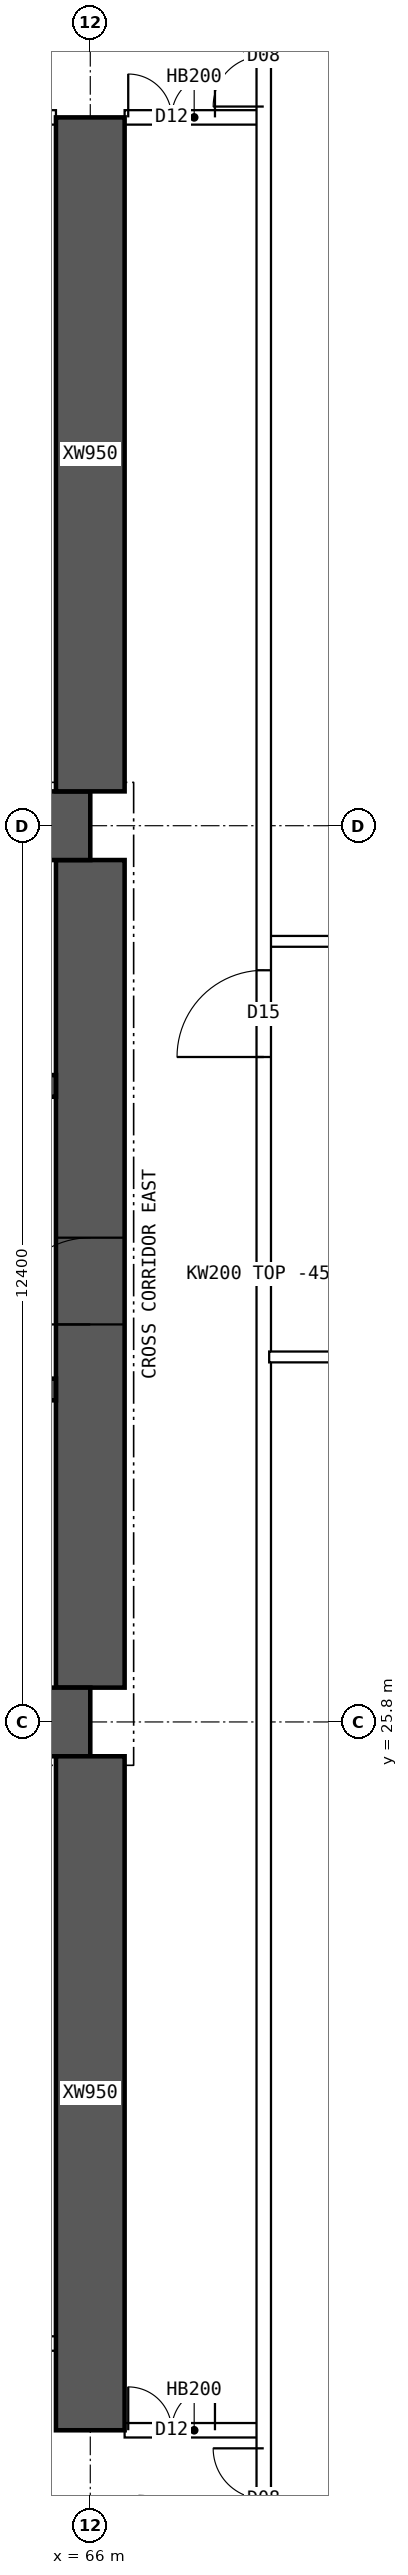
"""IFC4 building model, lengths in metres.
Left out: names, types, materials, properties, quantities, classifications, styles, units other than length and angle.
Written with IfcOpenShell. Run it as: python <this file> out.ifc"""

import sys

from ifc_helpers import new_model, si_unit, direction, frame, frame_2d, origin, place, context, subcontext, project, spatial, polyline, rectangle, outline, extrude, element, fill, save


model = new_model("IFC4")
c1 = context("Model", 3, precision=1e-05, world=origin(), true_north=direction((0.0, 1.0)))
c2 = subcontext(c1, "Body", "Model", "MODEL_VIEW")
j1 = project(units=[si_unit("LENGTHUNIT", "METRE"), si_unit("PLANEANGLEUNIT", "RADIAN")], contexts=[c1])
p1 = place(None, origin())
s1 = spatial("IfcSite", under=j1, at=p1, CompositionType="ELEMENT")
p2 = place(p1, origin())
s2 = spatial("IfcBuilding", under=s1, at=p2, CompositionType="ELEMENT")
p3 = place(p2, frame((0.0, 0.0, 110.65)))
s3 = spatial("IfcBuildingStorey", under=s2, at=p3, CompositionType="ELEMENT", Elevation=110.65)
for number, where, z_axis, x_axis in (
    (1, (18.0, 25.8, 0.0), (0.0, 0.0, 1.0), (1.0, 0.0, 0.0)),
    (2, (18.0, 38.2, 0.0), (0.0, 0.0, 1.0), (1.0, 0.0, 0.0)),
):
    element("IfcWall", number, at=place(p3, frame(where, z_axis=z_axis, x_axis=x_axis)), inside=s3, PredefinedType="SHEAR", context=c2, shape_type="SweptSolid", body=[
        extrude(rectangle(XDim=48.0, YDim=0.95, at=frame_2d((24.0, 0.0))), origin(), (0.0, 0.0, 1.0), 3.75),
    ])
p4 = place(p3, frame((66.0, 26.275, 0.0), z_axis=(0.0, 0.0, 1.0), x_axis=(0.0, 1.0, 0.0)))
e3 = element("IfcWall", 3, at=p4, inside=s3, PredefinedType="SHEAR", context=c2, shape_type="SweptSolid", body=[
    extrude(rectangle(XDim=11.45, YDim=0.95, at=frame_2d((5.725, 0.0))), origin(), (0.0, 0.0, 1.0), 3.75),
])
p5 = place(p4, frame((5.025, 0.0, 0.0)))
e4 = element("IfcOpeningElement", 4, at=p5, cuts=e3, PredefinedType="OPENING", context=c2, shape_type="SweptSolid", body=[
    extrude(rectangle(XDim=1.2, YDim=2.1, at=frame_2d((0.6, 1.05))), frame((0.0, 0.485, 0.0), z_axis=(0.0, -1.0, 0.0), x_axis=(1.0, 0.0, 0.0)), (0.0, 0.0, 1.0), 0.97),
])
p6 = place(p3, frame((18.475, 30.4, 0.0), z_axis=(0.0, 0.0, 1.0), x_axis=(1.0, 0.0, 0.0)))
e5 = element("IfcWall", 5, at=p6, inside=s3, PredefinedType="SHEAR", context=c2, shape_type="SweptSolid", body=[
    extrude(rectangle(XDim=47.05, YDim=0.3, at=frame_2d((23.525, 0.0))), origin(), (0.0, 0.0, 1.0), 3.75),
])
p7 = place(p6, frame((0.4, 0.0, 0.0)))
e6 = element("IfcOpeningElement", 6, at=p7, cuts=e5, PredefinedType="OPENING", context=c2, shape_type="SweptSolid", body=[
    extrude(rectangle(XDim=1.0, YDim=2.1, at=frame_2d((0.5, 1.05))), frame((0.0, 0.16, 0.0), z_axis=(0.0, -1.0, 0.0), x_axis=(1.0, 0.0, 0.0)), (0.0, 0.0, 1.0), 0.32),
])
p8 = place(p6, frame((45.65, 0.0, 0.0)))
e7 = element("IfcOpeningElement", 7, at=p8, cuts=e5, PredefinedType="OPENING", context=c2, shape_type="SweptSolid", body=[
    extrude(rectangle(XDim=1.0, YDim=2.1, at=frame_2d((0.5, 1.05))), frame((0.0, 0.16, 0.0), z_axis=(0.0, -1.0, 0.0), x_axis=(1.0, 0.0, 0.0)), (0.0, 0.0, 1.0), 0.32),
])
p9 = place(p6, frame((8.275, 0.0, 0.0)))
e8 = element("IfcOpeningElement", 8, at=p9, cuts=e5, PredefinedType="OPENING", context=c2, shape_type="SweptSolid", body=[
    extrude(rectangle(XDim=1.1, YDim=2.1, at=frame_2d((0.55, 1.05))), frame((0.0, 0.16, 0.0), z_axis=(0.0, -1.0, 0.0), x_axis=(1.0, 0.0, 0.0)), (0.0, 0.0, 1.0), 0.32),
])
p10 = place(p6, frame((10.875, 0.0, 0.0)))
e9 = element("IfcOpeningElement", 9, at=p10, cuts=e5, PredefinedType="OPENING", context=c2, shape_type="SweptSolid", body=[
    extrude(rectangle(XDim=1.1, YDim=2.1, at=frame_2d((0.55, 1.05))), frame((0.0, 0.16, 0.0), z_axis=(0.0, -1.0, 0.0), x_axis=(1.0, 0.0, 0.0)), (0.0, 0.0, 1.0), 0.32),
])
p11 = place(p6, frame((13.475, 0.0, 0.0)))
e10 = element("IfcOpeningElement", 10, at=p11, cuts=e5, PredefinedType="OPENING", context=c2, shape_type="SweptSolid", body=[
    extrude(rectangle(XDim=1.1, YDim=2.1, at=frame_2d((0.55, 1.05))), frame((0.0, 0.16, 0.0), z_axis=(0.0, -1.0, 0.0), x_axis=(1.0, 0.0, 0.0)), (0.0, 0.0, 1.0), 0.32),
])
p12 = place(p6, frame((16.075, 0.0, 0.0)))
e11 = element("IfcOpeningElement", 11, at=p12, cuts=e5, PredefinedType="OPENING", context=c2, shape_type="SweptSolid", body=[
    extrude(rectangle(XDim=1.1, YDim=2.1, at=frame_2d((0.55, 1.05))), frame((0.0, 0.16, 0.0), z_axis=(0.0, -1.0, 0.0), x_axis=(1.0, 0.0, 0.0)), (0.0, 0.0, 1.0), 0.32),
])
p13 = place(p6, frame((18.85, 0.0, 0.0)))
e12 = element("IfcOpeningElement", 12, at=p13, cuts=e5, PredefinedType="OPENING", context=c2, shape_type="SweptSolid", body=[
    extrude(rectangle(XDim=0.9, YDim=2.1, at=frame_2d((0.45, 1.05))), frame((0.0, 0.16, 0.0), z_axis=(0.0, -1.0, 0.0), x_axis=(1.0, 0.0, 0.0)), (0.0, 0.0, 1.0), 0.32),
])
p14 = place(p6, frame((30.142, 0.0, 0.0)))
e13 = element("IfcOpeningElement", 13, at=p14, cuts=e5, PredefinedType="OPENING", context=c2, shape_type="SweptSolid", body=[
    extrude(rectangle(XDim=1.1, YDim=2.1, at=frame_2d((0.55, 1.05))), frame((0.0, 0.16, 0.0), z_axis=(0.0, -1.0, 0.0), x_axis=(1.0, 0.0, 0.0)), (0.0, 0.0, 1.0), 0.32),
])
p15 = place(p6, frame((33.675, 0.0, 0.0)))
e14 = element("IfcOpeningElement", 14, at=p15, cuts=e5, PredefinedType="OPENING", context=c2, shape_type="SweptSolid", body=[
    extrude(rectangle(XDim=1.1, YDim=2.1, at=frame_2d((0.55, 1.05))), frame((0.0, 0.16, 0.0), z_axis=(0.0, -1.0, 0.0), x_axis=(1.0, 0.0, 0.0)), (0.0, 0.0, 1.0), 0.32),
])
p16 = place(p6, frame((37.208, 0.0, 0.0)))
e15 = element("IfcOpeningElement", 15, at=p16, cuts=e5, PredefinedType="OPENING", context=c2, shape_type="SweptSolid", body=[
    extrude(rectangle(XDim=1.1, YDim=2.1, at=frame_2d((0.55, 1.05))), frame((0.0, 0.16, 0.0), z_axis=(0.0, -1.0, 0.0), x_axis=(1.0, 0.0, 0.0)), (0.0, 0.0, 1.0), 0.32),
])
p17 = place(p3, frame((18.475, 34.6, 0.0), z_axis=(0.0, 0.0, 1.0), x_axis=(1.0, 0.0, 0.0)))
e16 = element("IfcWall", 16, at=p17, inside=s3, PredefinedType="SHEAR", context=c2, shape_type="SweptSolid", body=[
    extrude(rectangle(XDim=47.05, YDim=0.3, at=frame_2d((23.525, 0.0))), origin(), (0.0, 0.0, 1.0), 3.75),
])
p18 = place(p17, frame((0.9, 0.0, 0.0)))
e17 = element("IfcOpeningElement", 17, at=p18, cuts=e16, PredefinedType="OPENING", context=c2, shape_type="SweptSolid", body=[
    extrude(rectangle(XDim=1.1, YDim=2.1, at=frame_2d((0.55, 1.05))), frame((0.0, 0.16, 0.0), z_axis=(0.0, -1.0, 0.0), x_axis=(1.0, 0.0, 0.0)), (0.0, 0.0, 1.0), 0.32),
])
p19 = place(p17, frame((45.05, 0.0, 0.0)))
e18 = element("IfcOpeningElement", 18, at=p19, cuts=e16, PredefinedType="OPENING", context=c2, shape_type="SweptSolid", body=[
    extrude(rectangle(XDim=1.1, YDim=2.1, at=frame_2d((0.55, 1.05))), frame((0.0, 0.16, 0.0), z_axis=(0.0, -1.0, 0.0), x_axis=(1.0, 0.0, 0.0)), (0.0, 0.0, 1.0), 0.32),
])
p20 = place(p17, frame((4.125, 0.0, 0.0)))
e19 = element("IfcOpeningElement", 19, at=p20, cuts=e16, PredefinedType="OPENING", context=c2, shape_type="SweptSolid", body=[
    extrude(rectangle(XDim=0.9, YDim=2.1, at=frame_2d((0.45, 1.05))), frame((0.0, 0.16, 0.0), z_axis=(0.0, -1.0, 0.0), x_axis=(1.0, 0.0, 0.0)), (0.0, 0.0, 1.0), 0.32),
])
p21 = place(p17, frame((42.025, 0.0, 0.0)))
e20 = element("IfcOpeningElement", 20, at=p21, cuts=e16, PredefinedType="OPENING", context=c2, shape_type="SweptSolid", body=[
    extrude(rectangle(XDim=0.9, YDim=2.1, at=frame_2d((0.45, 1.05))), frame((0.0, 0.16, 0.0), z_axis=(0.0, -1.0, 0.0), x_axis=(1.0, 0.0, 0.0)), (0.0, 0.0, 1.0), 0.32),
])
p22 = place(p17, frame((8.9, 0.0, 0.0)))
e21 = element("IfcOpeningElement", 21, at=p22, cuts=e16, PredefinedType="OPENING", context=c2, shape_type="SweptSolid", body=[
    extrude(rectangle(XDim=0.9, YDim=2.1, at=frame_2d((0.45, 1.05))), frame((0.0, 0.16, 0.0), z_axis=(0.0, -1.0, 0.0), x_axis=(1.0, 0.0, 0.0)), (0.0, 0.0, 1.0), 0.32),
])
p23 = place(p17, frame((12.874, 0.0, 0.0)))
e22 = element("IfcOpeningElement", 22, at=p23, cuts=e16, PredefinedType="OPENING", context=c2, shape_type="SweptSolid", body=[
    extrude(rectangle(XDim=0.9, YDim=2.1, at=frame_2d((0.45, 1.05))), frame((0.0, 0.16, 0.0), z_axis=(0.0, -1.0, 0.0), x_axis=(1.0, 0.0, 0.0)), (0.0, 0.0, 1.0), 0.32),
])
p24 = place(p17, frame((16.521, 0.0, 0.0)))
e23 = element("IfcOpeningElement", 23, at=p24, cuts=e16, PredefinedType="OPENING", context=c2, shape_type="SweptSolid", body=[
    extrude(rectangle(XDim=0.9, YDim=2.1, at=frame_2d((0.45, 1.05))), frame((0.0, 0.16, 0.0), z_axis=(0.0, -1.0, 0.0), x_axis=(1.0, 0.0, 0.0)), (0.0, 0.0, 1.0), 0.32),
])
p25 = place(p17, frame((20.28, 0.0, 0.0)))
e24 = element("IfcOpeningElement", 24, at=p25, cuts=e16, PredefinedType="OPENING", context=c2, shape_type="SweptSolid", body=[
    extrude(rectangle(XDim=0.9, YDim=2.1, at=frame_2d((0.45, 1.05))), frame((0.0, 0.16, 0.0), z_axis=(0.0, -1.0, 0.0), x_axis=(1.0, 0.0, 0.0)), (0.0, 0.0, 1.0), 0.32),
])
p26 = place(p17, frame((24.686, 0.0, 0.0)))
e25 = element("IfcOpeningElement", 25, at=p26, cuts=e16, PredefinedType="OPENING", context=c2, shape_type="SweptSolid", body=[
    extrude(rectangle(XDim=0.9, YDim=2.1, at=frame_2d((0.45, 1.05))), frame((0.0, 0.16, 0.0), z_axis=(0.0, -1.0, 0.0), x_axis=(1.0, 0.0, 0.0)), (0.0, 0.0, 1.0), 0.32),
])
p27 = place(p17, frame((27.483, 0.0, 0.0)))
e26 = element("IfcOpeningElement", 26, at=p27, cuts=e16, PredefinedType="OPENING", context=c2, shape_type="SweptSolid", body=[
    extrude(rectangle(XDim=0.9, YDim=2.1, at=frame_2d((0.45, 1.05))), frame((0.0, 0.16, 0.0), z_axis=(0.0, -1.0, 0.0), x_axis=(1.0, 0.0, 0.0)), (0.0, 0.0, 1.0), 0.32),
])
p28 = place(p17, frame((29.856, 0.0, 0.0)))
e27 = element("IfcOpeningElement", 27, at=p28, cuts=e16, PredefinedType="OPENING", context=c2, shape_type="SweptSolid", body=[
    extrude(rectangle(XDim=0.9, YDim=2.1, at=frame_2d((0.45, 1.05))), frame((0.0, 0.16, 0.0), z_axis=(0.0, -1.0, 0.0), x_axis=(1.0, 0.0, 0.0)), (0.0, 0.0, 1.0), 0.32),
])
p29 = place(p17, frame((35.326, 0.0, 0.0)))
e28 = element("IfcOpeningElement", 28, at=p29, cuts=e16, PredefinedType="OPENING", context=c2, shape_type="SweptSolid", body=[
    extrude(rectangle(XDim=0.9, YDim=2.1, at=frame_2d((0.45, 1.05))), frame((0.0, 0.16, 0.0), z_axis=(0.0, -1.0, 0.0), x_axis=(1.0, 0.0, 0.0)), (0.0, 0.0, 1.0), 0.32),
])
for number, where, z_axis, x_axis in (
    (29, (66.0, 16.0, 0.0), (0.0, 0.0, 1.0), (0.0, 1.0, 0.0)),
    (30, (66.0, 38.675, 0.0), (0.0, 0.0, 1.0), (0.0, 1.0, 0.0)),
):
    element("IfcWall", number, at=place(p3, frame(where, z_axis=z_axis, x_axis=x_axis)), inside=s3, PredefinedType="SHEAR", context=c2, shape_type="SweptSolid", body=[
        extrude(rectangle(XDim=9.325, YDim=0.95, at=frame_2d((4.663, 0.0))), origin(), (0.0, 0.0, 1.0), 3.75),
    ])
p30 = place(p3, frame((66.475, 16.0, 0.0), z_axis=(0.0, 0.0, 1.0), x_axis=(1.0, 0.0, 0.0)))
e31 = element("IfcWall", 31, at=p30, inside=s3, PredefinedType="SOLIDWALL", context=c2, shape_type="SweptSolid", body=[
    extrude(rectangle(XDim=1.925, YDim=0.2, at=frame_2d((0.962, 0.0))), origin(), (0.0, 0.0, 1.0), 3.3),
])
p31 = place(p30, frame((0.05, 0.0, 0.0)))
e32 = element("IfcOpeningElement", 32, at=p31, cuts=e31, PredefinedType="OPENING", context=c2, shape_type="SweptSolid", body=[
    extrude(rectangle(XDim=1.2, YDim=2.1, at=frame_2d((0.6, 1.05))), frame((0.0, 0.11, 0.0), z_axis=(0.0, -1.0, 0.0), x_axis=(1.0, 0.0, 0.0)), (0.0, 0.0, 1.0), 0.22),
])
p32 = place(p3, frame((60.475, 48.0, 0.0), z_axis=(0.0, 0.0, 1.0), x_axis=(1.0, 0.0, 0.0)))
e33 = element("IfcWall", 33, at=p32, inside=s3, PredefinedType="SOLIDWALL", context=c2, shape_type="SweptSolid", body=[
    extrude(rectangle(XDim=5.05, YDim=0.2, at=frame_2d((2.525, 0.0))), origin(), (0.0, 0.0, 1.0), 3.3),
])
p33 = place(p32, frame((0.4, 0.0, 0.0)))
e34 = element("IfcOpeningElement", 34, at=p33, cuts=e33, PredefinedType="OPENING", context=c2, shape_type="SweptSolid", body=[
    extrude(rectangle(XDim=1.0, YDim=2.1, at=frame_2d((0.5, 1.05))), frame((0.0, 0.11, 0.0), z_axis=(0.0, -1.0, 0.0), x_axis=(1.0, 0.0, 0.0)), (0.0, 0.0, 1.0), 0.22),
])
p34 = place(p3, frame((66.475, 48.0, 0.0), z_axis=(0.0, 0.0, 1.0), x_axis=(1.0, 0.0, 0.0)))
e35 = element("IfcWall", 35, at=p34, inside=s3, PredefinedType="SOLIDWALL", context=c2, shape_type="SweptSolid", body=[
    extrude(rectangle(XDim=1.925, YDim=0.2, at=frame_2d((0.962, 0.0))), origin(), (0.0, 0.0, 1.0), 3.3),
])
p35 = place(p34, frame((0.05, 0.0, 0.0)))
e36 = element("IfcOpeningElement", 36, at=p35, cuts=e35, PredefinedType="OPENING", context=c2, shape_type="SweptSolid", body=[
    extrude(rectangle(XDim=1.2, YDim=2.1, at=frame_2d((0.6, 1.05))), frame((0.0, 0.11, 0.0), z_axis=(0.0, -1.0, 0.0), x_axis=(1.0, 0.0, 0.0)), (0.0, 0.0, 1.0), 0.22),
])
p36 = place(p3, frame((60.475, 17.2, 0.0), z_axis=(0.0, 0.0, 1.0), x_axis=(1.0, 0.0, 0.0)))
e37 = element("IfcWall", 37, at=p36, inside=s3, PredefinedType="SOLIDWALL", context=c2, shape_type="SweptSolid", body=[
    extrude(rectangle(XDim=5.05, YDim=0.2, at=frame_2d((2.525, 0.0))), origin(), (0.0, 0.0, 1.0), 3.3),
])
p37 = place(p36, frame((0.4, 0.0, 0.0)))
e38 = element("IfcOpeningElement", 38, at=p37, cuts=e37, PredefinedType="OPENING", context=c2, shape_type="SweptSolid", body=[
    extrude(rectangle(XDim=1.0, YDim=2.1, at=frame_2d((0.5, 1.05))), frame((0.0, 0.11, 0.0), z_axis=(0.0, -1.0, 0.0), x_axis=(1.0, 0.0, 0.0)), (0.0, 0.0, 1.0), 0.22),
])
p38 = place(p3, frame((68.475, 30.85, 0.0), z_axis=(0.0, 0.0, 1.0), x_axis=(1.0, 0.0, 0.0)))
e39 = element("IfcWall", 39, at=p38, inside=s3, PredefinedType="PARTITIONING", context=c2, shape_type="SweptSolid", body=[
    extrude(outline(polyline([(0.0, 0.0), (6.82, 0.0), (6.82, 3.3), (3.827, 3.3), (3.825, 2.85), (3.227, 2.85), (3.225, 3.3), (0.0, 3.3), (0.0, 0.0)])), frame((0.0, 0.075, 0.0), z_axis=(0.0, -1.0, 0.0), x_axis=(1.0, 0.0, 0.0)), (0.0, 0.0, 1.0), 0.15),
])
p39 = place(p3, frame((68.4, 9.405, 0.0), z_axis=(0.0, 0.0, 1.0), x_axis=(0.0, 1.0, 0.0)))
e40 = element("IfcWall", 40, at=p39, inside=s3, PredefinedType="SOLIDWALL", context=c2, shape_type="SweptSolid", body=[
    extrude(rectangle(XDim=45.189, YDim=0.2, at=frame_2d((22.595, 0.0))), origin(), (0.0, 0.0, 1.0), 3.3),
])
p40 = place(p39, frame((25.595, 0.0, 0.0)))
e41 = element("IfcOpeningElement", 41, at=p40, cuts=e40, PredefinedType="OPENING", context=c2, shape_type="SweptSolid", body=[
    extrude(rectangle(XDim=1.2, YDim=2.1, at=frame_2d((0.6, 1.05))), frame((0.0, 0.11, 0.0), z_axis=(0.0, -1.0, 0.0), x_axis=(1.0, 0.0, 0.0)), (0.0, 0.0, 1.0), 0.22),
])
p41 = place(p39, frame((4.945, 0.0, 0.0)))
e42 = element("IfcOpeningElement", 42, at=p41, cuts=e40, PredefinedType="OPENING", context=c2, shape_type="SweptSolid", body=[
    extrude(rectangle(XDim=1.4, YDim=2.1, at=frame_2d((0.7, 1.05))), frame((0.0, 0.11, 0.0), z_axis=(0.0, -1.0, 0.0), x_axis=(1.0, 0.0, 0.0)), (0.0, 0.0, 1.0), 0.22),
])
p42 = place(p39, frame((38.745, 0.0, 0.0)))
e43 = element("IfcOpeningElement", 43, at=p42, cuts=e40, PredefinedType="OPENING", context=c2, shape_type="SweptSolid", body=[
    extrude(rectangle(XDim=1.4, YDim=2.1, at=frame_2d((0.7, 1.05))), frame((0.0, 0.11, 0.0), z_axis=(0.0, -1.0, 0.0), x_axis=(1.0, 0.0, 0.0)), (0.0, 0.0, 1.0), 0.22),
])
p43 = place(p3, frame((68.475, 36.6, 0.0), z_axis=(0.0, 0.0, 1.0), x_axis=(1.0, 0.0, 0.0)))
e44 = element("IfcWall", 44, at=p43, inside=s3, PredefinedType="PARTITIONING", context=c2, shape_type="SweptSolid", body=[
    extrude(rectangle(XDim=6.82, YDim=0.15, at=frame_2d((3.41, 0.0))), origin(), (0.0, 0.0, 1.0), 3.3),
])
p44 = place(p5, origin())
e45 = element("IfcDoor", 45, at=p44, inside=s3, OperationType="SINGLE_SWING_LEFT", PredefinedType="DOOR", context=c2, shape_type="SweptSolid", body=[
    extrude(rectangle(XDim=1.2, YDim=2.1, at=frame_2d((0.6, 1.05))), frame((0.0, 0.025, 0.0), z_axis=(0.0, -1.0, 0.0), x_axis=(1.0, 0.0, 0.0)), (0.0, 0.0, 1.0), 0.05),
])
fill(e4, e45)
p45 = place(p31, origin())
e46 = element("IfcDoor", 46, at=p45, inside=s3, OperationType="DOUBLE_DOOR_SINGLE_SWING", PredefinedType="DOOR", context=c2, shape_type="SweptSolid", body=[
    extrude(rectangle(XDim=1.2, YDim=2.1, at=frame_2d((0.6, 1.05))), frame((0.0, 0.025, 0.0), z_axis=(0.0, -1.0, 0.0), x_axis=(1.0, 0.0, 0.0)), (0.0, 0.0, 1.0), 0.05),
])
fill(e32, e46)
p46 = place(p35, origin())
e47 = element("IfcDoor", 47, at=p46, inside=s3, OperationType="DOUBLE_DOOR_SINGLE_SWING", PredefinedType="DOOR", context=c2, shape_type="SweptSolid", body=[
    extrude(rectangle(XDim=1.2, YDim=2.1, at=frame_2d((0.6, 1.05))), frame((0.0, 0.025, 0.0), z_axis=(0.0, -1.0, 0.0), x_axis=(1.0, 0.0, 0.0)), (0.0, 0.0, 1.0), 0.05),
])
fill(e36, e47)
p47 = place(p40, origin())
e48 = element("IfcDoor", 48, at=p47, inside=s3, OperationType="SINGLE_SWING_LEFT", PredefinedType="DOOR", context=c2, shape_type="SweptSolid", body=[
    extrude(rectangle(XDim=1.2, YDim=2.1, at=frame_2d((0.6, 1.05))), frame((0.0, 0.025, 0.0), z_axis=(0.0, -1.0, 0.0), x_axis=(1.0, 0.0, 0.0)), (0.0, 0.0, 1.0), 0.05),
])
fill(e41, e48)
p48 = place(p41, origin())
e49 = element("IfcDoor", 49, at=p48, inside=s3, OperationType="DOUBLE_DOOR_SINGLE_SWING", PredefinedType="DOOR", context=c2, shape_type="SweptSolid", body=[
    extrude(rectangle(XDim=1.4, YDim=2.1, at=frame_2d((0.7, 1.05))), frame((0.0, 0.025, 0.0), z_axis=(0.0, -1.0, 0.0), x_axis=(1.0, 0.0, 0.0)), (0.0, 0.0, 1.0), 0.05),
])
fill(e42, e49)
p49 = place(p42, origin())
e50 = element("IfcDoor", 50, at=p49, inside=s3, OperationType="DOUBLE_DOOR_SINGLE_SWING", PredefinedType="DOOR", context=c2, shape_type="SweptSolid", body=[
    extrude(rectangle(XDim=1.4, YDim=2.1, at=frame_2d((0.7, 1.05))), frame((0.0, 0.025, 0.0), z_axis=(0.0, -1.0, 0.0), x_axis=(1.0, 0.0, 0.0)), (0.0, 0.0, 1.0), 0.05),
])
fill(e43, e50)
save(model, sys.argv[1])
